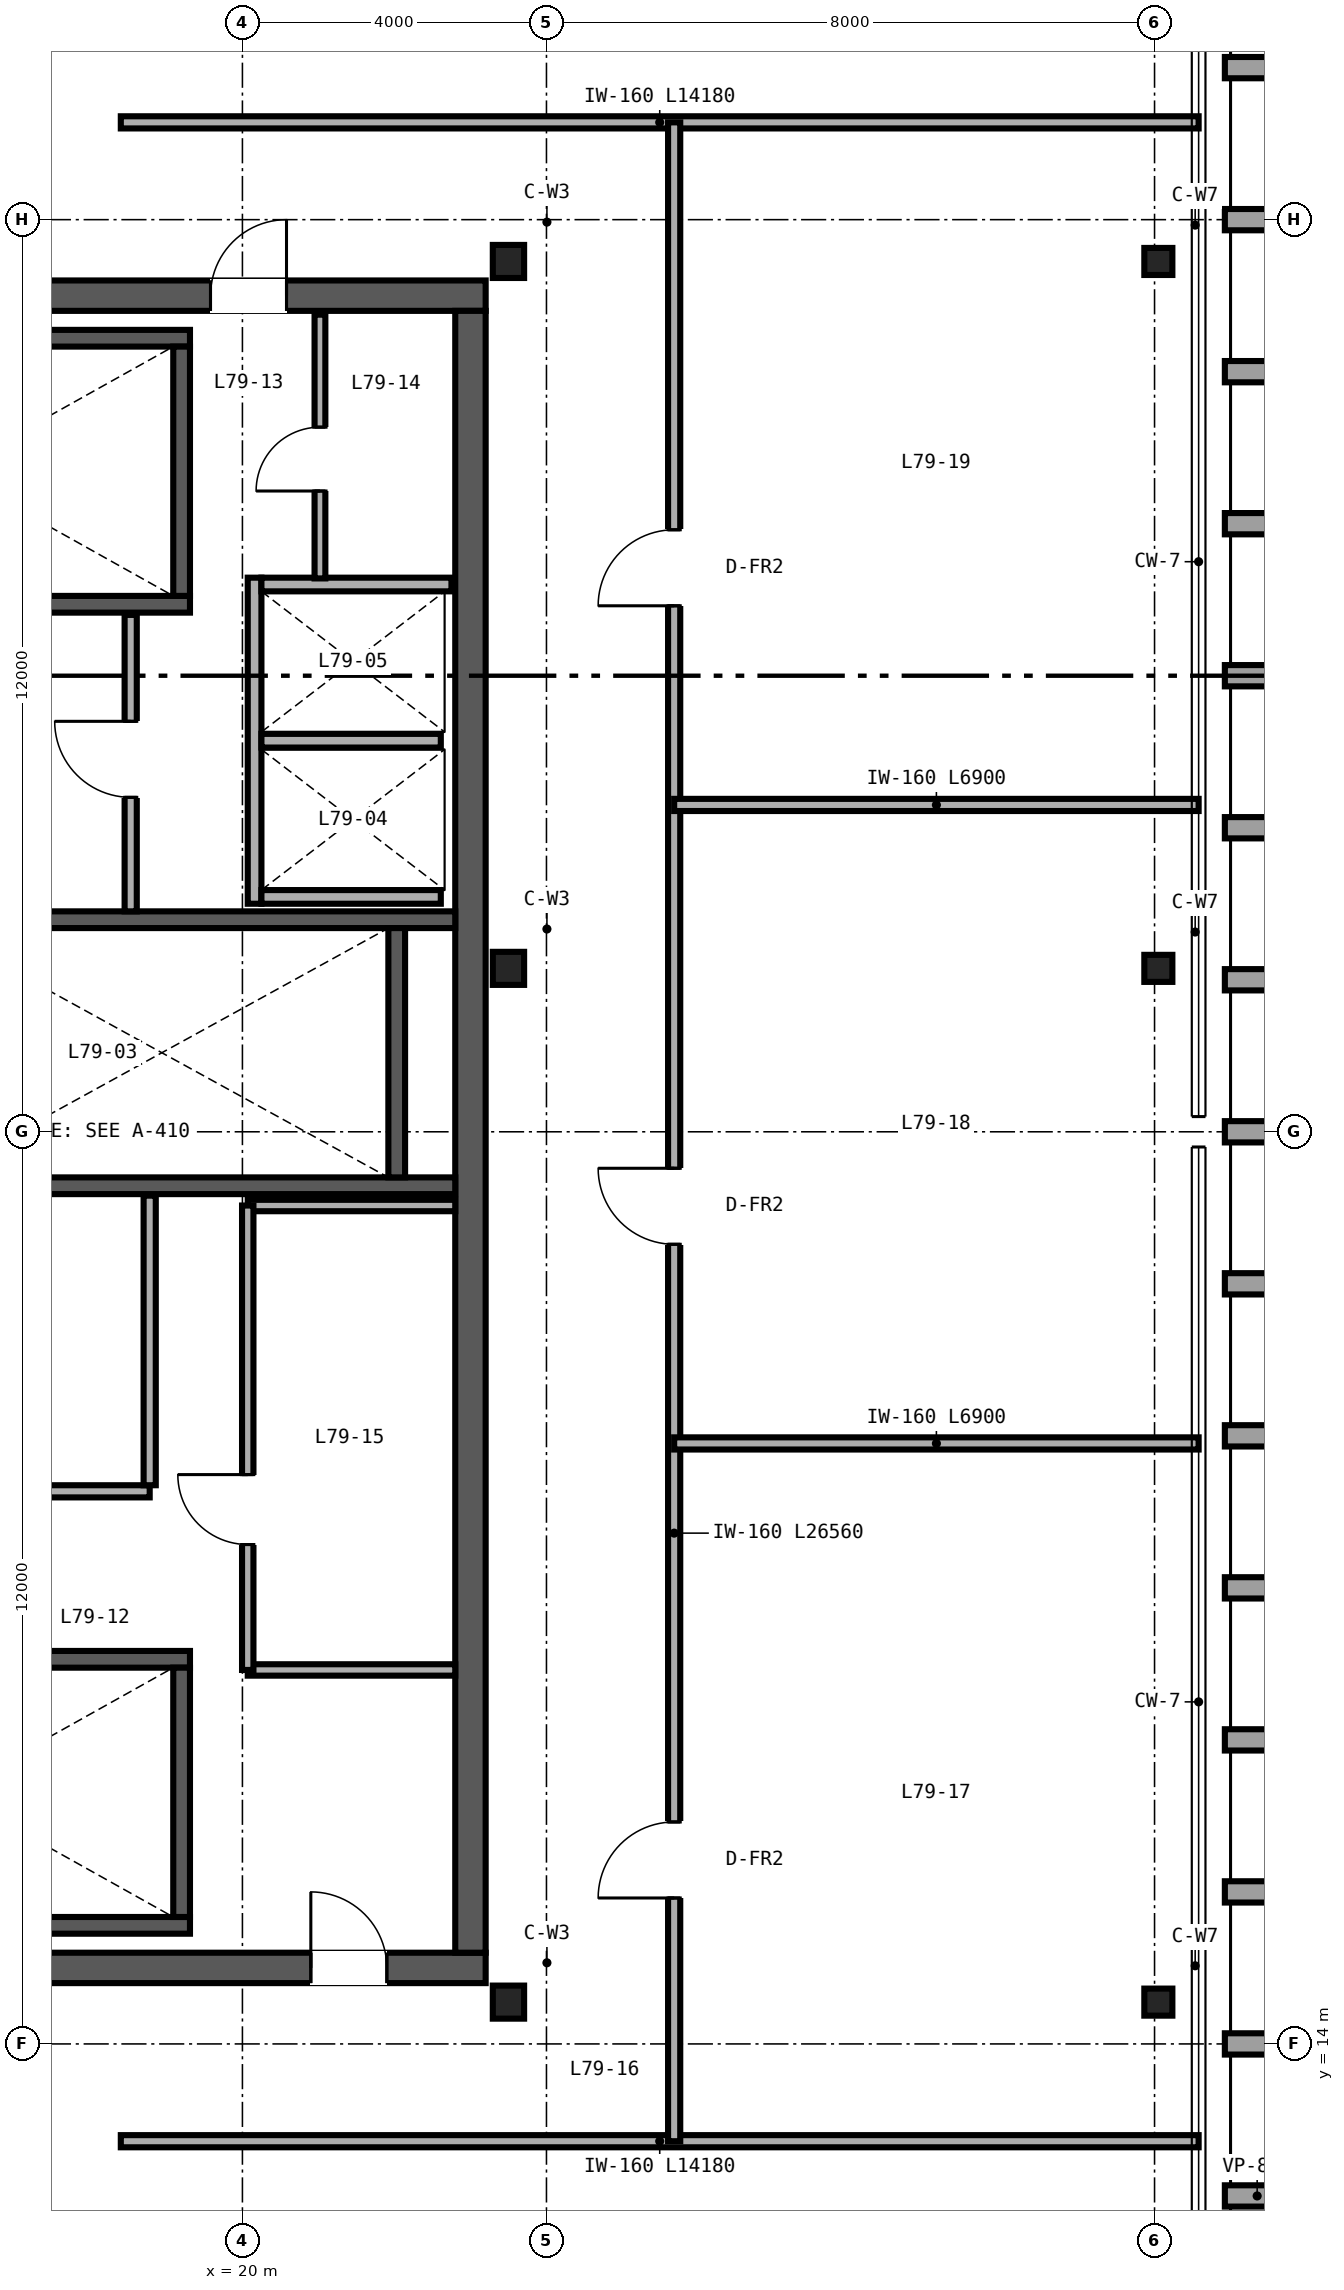
"""IFC4 building model, lengths in metres.
Left out: names, types, materials, properties, quantities, classifications, styles, units other than length and angle.
Written with IfcOpenShell. Run it as: python <this file> out.ifc"""

import sys

from ifc_helpers import new_model, si_unit, direction, frame, frame_2d, origin, origin_2d, place, context, subcontext, project, spatial, rectangle, i_section, extrude, source, transform, mapped, element, fill, save


model = new_model("IFC4")
c1 = context("Model", 3, precision=1e-05, world=origin(), true_north=direction((0.0, 1.0)))
c2 = subcontext(c1, "Body", "Model", "MODEL_VIEW")
j1 = project(units=[si_unit("LENGTHUNIT", "METRE"), si_unit("PLANEANGLEUNIT", "RADIAN")], contexts=[c1])
p1 = place(None, origin())
s1 = spatial("IfcSite", under=j1, at=p1, CompositionType="ELEMENT")
p2 = place(p1, origin())
s2 = spatial("IfcBuilding", under=s1, at=p2, CompositionType="ELEMENT")
p3 = place(p2, frame((0.0, 0.0, 309.6)))
s3 = spatial("IfcBuildingStorey", under=s2, at=p3, CompositionType="ELEMENT", Elevation=309.6)
p4 = place(p3, frame((10.8, 15.0, 0.0), z_axis=(0.0, 0.0, 1.0), x_axis=(1.0, 0.0, 0.0)))
e1 = element("IfcWall", 1, at=p4, inside=s3, PredefinedType="SHEAR", context=c2, shape_type="SweptSolid", body=[
    extrude(rectangle(XDim=12.4, YDim=0.4, at=frame_2d((6.2, 0.0))), origin(), (0.0, 0.0, 1.0), 5.0),
])
p5 = place(p4, frame((10.1, 0.0, 0.0)))
e2 = element("IfcOpeningElement", 2, at=p5, cuts=e1, PredefinedType="OPENING", context=c2, shape_type="SweptSolid", body=[
    extrude(rectangle(XDim=1.0, YDim=2.15, at=frame_2d((0.5, 1.075))), frame((0.0, 0.21, 0.0), z_axis=(0.0, -1.0, 0.0), x_axis=(1.0, 0.0, 0.0)), (0.0, 0.0, 1.0), 0.42),
])
p6 = place(p3, frame((10.8, 37.0, 0.0), z_axis=(0.0, 0.0, 1.0), x_axis=(1.0, 0.0, 0.0)))
e3 = element("IfcWall", 3, at=p6, inside=s3, PredefinedType="SHEAR", context=c2, shape_type="SweptSolid", body=[
    extrude(rectangle(XDim=12.4, YDim=0.4, at=frame_2d((6.2, 0.0))), origin(), (0.0, 0.0, 1.0), 5.0),
])
p7 = place(p6, frame((8.78, 0.0, 0.0)))
e4 = element("IfcOpeningElement", 4, at=p7, cuts=e3, PredefinedType="OPENING", context=c2, shape_type="SweptSolid", body=[
    extrude(rectangle(XDim=1.0, YDim=2.15, at=frame_2d((0.5, 1.075))), frame((0.0, 0.21, 0.0), z_axis=(0.0, -1.0, 0.0), x_axis=(1.0, 0.0, 0.0)), (0.0, 0.0, 1.0), 0.42),
])
p8 = place(p3, frame((23.0, 15.2, 0.0), z_axis=(0.0, 0.0, 1.0), x_axis=(0.0, 1.0, 0.0)))
e5 = element("IfcWall", 5, at=p8, inside=s3, PredefinedType="SHEAR", context=c2, shape_type="SweptSolid", body=[
    extrude(rectangle(XDim=21.6, YDim=0.4, at=frame_2d((10.8, 0.0))), origin(), (0.0, 0.0, 1.0), 5.0),
])
p9 = place(p3, frame((11.2, 15.56, 0.0), z_axis=(0.0, 0.0, 1.0), x_axis=(1.0, 0.0, 0.0)))
e6 = element("IfcWall", 6, at=p9, inside=s3, PredefinedType="SHEAR", context=c2, shape_type="SweptSolid", body=[
    extrude(rectangle(XDim=8.11, YDim=0.22, at=frame_2d((4.055, 0.0))), origin(), (0.0, 0.0, 1.0), 5.0),
])
p10 = place(p3, frame((11.2, 19.06, 0.0), z_axis=(0.0, 0.0, 1.0), x_axis=(1.0, 0.0, 0.0)))
e7 = element("IfcWall", 7, at=p10, inside=s3, PredefinedType="SHEAR", context=c2, shape_type="SweptSolid", body=[
    extrude(rectangle(XDim=8.11, YDim=0.22, at=frame_2d((4.055, 0.0))), origin(), (0.0, 0.0, 1.0), 5.0),
])
p11 = place(p10, frame((0.72, 0.0, 0.0)))
e8 = element("IfcOpeningElement", 8, at=p11, cuts=e7, PredefinedType="OPENING", context=c2, shape_type="SweptSolid", body=[
    extrude(rectangle(XDim=1.05, YDim=2.15, at=frame_2d((0.525, 1.075))), frame((0.0, 0.12, 0.0), z_axis=(0.0, -1.0, 0.0), x_axis=(1.0, 0.0, 0.0)), (0.0, 0.0, 1.0), 0.24),
])
p12 = place(p3, frame((19.2, 15.67, 0.0), z_axis=(0.0, 0.0, 1.0), x_axis=(0.0, 1.0, 0.0)))
e9 = element("IfcWall", 9, at=p12, inside=s3, PredefinedType="SHEAR", context=c2, shape_type="SweptSolid", body=[
    extrude(rectangle(XDim=3.28, YDim=0.22, at=frame_2d((1.64, 0.0))), origin(), (0.0, 0.0, 1.0), 5.0),
])
p13 = place(p3, frame((11.2, 32.94, 0.0), z_axis=(0.0, 0.0, 1.0), x_axis=(1.0, 0.0, 0.0)))
e10 = element("IfcWall", 10, at=p13, inside=s3, PredefinedType="SHEAR", context=c2, shape_type="SweptSolid", body=[
    extrude(rectangle(XDim=8.11, YDim=0.22, at=frame_2d((4.055, 0.0))), origin(), (0.0, 0.0, 1.0), 5.0),
])
p14 = place(p13, frame((0.72, 0.0, 0.0)))
e11 = element("IfcOpeningElement", 11, at=p14, cuts=e10, PredefinedType="OPENING", context=c2, shape_type="SweptSolid", body=[
    extrude(rectangle(XDim=1.05, YDim=2.15, at=frame_2d((0.525, 1.075))), frame((0.0, 0.12, 0.0), z_axis=(0.0, -1.0, 0.0), x_axis=(1.0, 0.0, 0.0)), (0.0, 0.0, 1.0), 0.24),
])
p15 = place(p3, frame((11.2, 36.44, 0.0), z_axis=(0.0, 0.0, 1.0), x_axis=(1.0, 0.0, 0.0)))
e12 = element("IfcWall", 12, at=p15, inside=s3, PredefinedType="SHEAR", context=c2, shape_type="SweptSolid", body=[
    extrude(rectangle(XDim=8.11, YDim=0.22, at=frame_2d((4.055, 0.0))), origin(), (0.0, 0.0, 1.0), 5.0),
])
p16 = place(p3, frame((19.2, 33.05, 0.0), z_axis=(0.0, 0.0, 1.0), x_axis=(0.0, 1.0, 0.0)))
e13 = element("IfcWall", 13, at=p16, inside=s3, PredefinedType="SHEAR", context=c2, shape_type="SweptSolid", body=[
    extrude(rectangle(XDim=3.28, YDim=0.22, at=frame_2d((1.64, 0.0))), origin(), (0.0, 0.0, 1.0), 5.0),
])
p17 = place(p3, frame((14.18, 25.29, 0.0), z_axis=(0.0, 0.0, 1.0), x_axis=(1.0, 0.0, 0.0)))
e14 = element("IfcWall", 14, at=p17, inside=s3, PredefinedType="SHEAR", context=c2, shape_type="SweptSolid", body=[
    extrude(rectangle(XDim=8.62, YDim=0.22, at=frame_2d((4.31, 0.0))), origin(), (0.0, 0.0, 1.0), 5.0),
])
p18 = place(p17, frame((0.47, 0.0, 0.0)))
e15 = element("IfcOpeningElement", 15, at=p18, cuts=e14, PredefinedType="OPENING", context=c2, shape_type="SweptSolid", body=[
    extrude(rectangle(XDim=1.05, YDim=2.15, at=frame_2d((0.525, 1.075))), frame((0.0, 0.12, 0.0), z_axis=(0.0, -1.0, 0.0), x_axis=(1.0, 0.0, 0.0)), (0.0, 0.0, 1.0), 0.24),
])
p19 = place(p3, frame((14.18, 28.79, 0.0), z_axis=(0.0, 0.0, 1.0), x_axis=(1.0, 0.0, 0.0)))
e16 = element("IfcWall", 16, at=p19, inside=s3, PredefinedType="SHEAR", context=c2, shape_type="SweptSolid", body=[
    extrude(rectangle(XDim=8.62, YDim=0.22, at=frame_2d((4.31, 0.0))), origin(), (0.0, 0.0, 1.0), 5.0),
])
p20 = place(p3, frame((22.03, 25.4, 0.0), z_axis=(0.0, 0.0, 1.0), x_axis=(0.0, 1.0, 0.0)))
e17 = element("IfcWall", 17, at=p20, inside=s3, PredefinedType="SHEAR", context=c2, shape_type="SweptSolid", body=[
    extrude(rectangle(XDim=3.28, YDim=0.22, at=frame_2d((1.64, 0.0))), origin(), (0.0, 0.0, 1.0), 5.0),
])
m1 = source(origin(), c2, "Body", "SweptSolid", [
    extrude(i_section(OverallWidth=0.412, OverallDepth=0.435, WebThickness=0.036, FlangeThickness=0.057, FilletRadius=0.025, at=origin_2d()), origin(), (0.0, 0.0, 1.0), 5.0),
])
for number, where, z_axis, x_axis in (
    (18, (23.5, 14.55, 0.0), (0.0, 0.0, 1.0), (1.0, 0.0, 0.0)),
    (19, (23.5, 28.15, 0.0), (0.0, 0.0, 1.0), (1.0, 0.0, 0.0)),
    (20, (23.5, 37.45, 0.0), (0.0, 0.0, 1.0), (1.0, 0.0, 0.0)),
):
    element("IfcColumn", number, at=place(p3, frame(where, z_axis=z_axis, x_axis=x_axis)), inside=s3, PredefinedType="COLUMN", context=c2, shape_type="MappedRepresentation", body=[
        mapped(m1, transform((0.0, 0.0, 0.0), scale=1.0)),
    ])
m2 = source(origin(), c2, "Body", "SweptSolid", [
    extrude(i_section(OverallWidth=0.369, OverallDepth=0.356, WebThickness=0.011, FlangeThickness=0.018, FilletRadius=0.025, at=origin_2d()), origin(), (0.0, 0.0, 1.0), 5.0),
])
for number, where, z_axis, x_axis in (
    (21, (32.05, 14.55, 0.0), (0.0, 0.0, 1.0), (1.0, 0.0, 0.0)),
    (22, (32.05, 28.15, 0.0), (0.0, 0.0, 1.0), (1.0, 0.0, 0.0)),
    (23, (32.05, 37.45, 0.0), (0.0, 0.0, 1.0), (1.0, 0.0, 0.0)),
):
    element("IfcColumn", number, at=place(p3, frame(where, z_axis=z_axis, x_axis=x_axis)), inside=s3, PredefinedType="COLUMN", context=c2, shape_type="MappedRepresentation", body=[
        mapped(m2, transform((0.0, 0.0, 0.0), scale=1.0)),
    ])
p21 = place(p3, frame((20.16, 29.0, 0.0), z_axis=(0.0, 0.0, 1.0), x_axis=(0.0, 1.0, 0.0)))
e24 = element("IfcWall", 24, at=p21, inside=s3, PredefinedType="SOLIDWALL", context=c2, shape_type="SweptSolid", body=[
    extrude(rectangle(XDim=4.29, YDim=0.18, at=frame_2d((2.145, 0.0))), origin(), (0.0, 0.0, 1.0), 4.591),
])
p22 = place(p3, frame((20.25, 29.09, 0.0), z_axis=(0.0, 0.0, 1.0), x_axis=(1.0, 0.0, 0.0)))
e25 = element("IfcWall", 25, at=p22, inside=s3, PredefinedType="SOLIDWALL", context=c2, shape_type="SweptSolid", body=[
    extrude(rectangle(XDim=2.36, YDim=0.18, at=frame_2d((1.18, 0.0))), origin(), (0.0, 0.0, 1.0), 4.591),
])
p23 = place(p3, frame((20.25, 33.2, 0.0), z_axis=(0.0, 0.0, 1.0), x_axis=(1.0, 0.0, 0.0)))
e26 = element("IfcWall", 26, at=p23, inside=s3, PredefinedType="SOLIDWALL", context=c2, shape_type="SweptSolid", body=[
    extrude(rectangle(XDim=2.5, YDim=0.18, at=frame_2d((1.25, 0.0))), origin(), (0.0, 0.0, 1.0), 5.0),
])
p24 = place(p3, frame((20.25, 31.145, 0.0), z_axis=(0.0, 0.0, 1.0), x_axis=(1.0, 0.0, 0.0)))
e27 = element("IfcWall", 27, at=p24, inside=s3, PredefinedType="SOLIDWALL", context=c2, shape_type="SweptSolid", body=[
    extrude(rectangle(XDim=2.36, YDim=0.18, at=frame_2d((1.18, 0.0))), origin(), (0.0, 0.0, 1.0), 5.0),
])
p25 = place(p3, frame((14.2, 21.27, 0.0), z_axis=(0.0, 0.0, 1.0), x_axis=(1.0, 0.0, 0.0)))
e28 = element("IfcWall", 28, at=p25, inside=s3, PredefinedType="PARTITIONING", context=c2, shape_type="SweptSolid", body=[
    extrude(rectangle(XDim=4.58, YDim=0.16, at=frame_2d((2.29, 0.0))), origin(), (0.0, 0.0, 1.0), 5.0),
])
p26 = place(p25, frame((1.8, 0.0, 0.0)))
e29 = element("IfcOpeningElement", 29, at=p26, cuts=e28, PredefinedType="OPENING", context=c2, shape_type="SweptSolid", body=[
    extrude(rectangle(XDim=1.0, YDim=2.15, at=frame_2d((0.5, 1.075))), frame((0.0, 0.09, 0.0), z_axis=(0.0, -1.0, 0.0), x_axis=(1.0, 0.0, 0.0)), (0.0, 0.0, 1.0), 0.18),
])
p27 = place(p3, frame((18.78, 21.35, 0.0), z_axis=(0.0, 0.0, 1.0), x_axis=(0.0, 1.0, 0.0)))
e30 = element("IfcWall", 30, at=p27, inside=s3, PredefinedType="PARTITIONING", context=c2, shape_type="SweptSolid", body=[
    extrude(rectangle(XDim=3.81, YDim=0.16, at=frame_2d((1.905, 0.0))), origin(), (0.0, 0.0, 1.0), 4.591),
])
p28 = place(p3, frame((18.53, 28.9, 0.0), z_axis=(0.0, 0.0, 1.0), x_axis=(0.0, 1.0, 0.0)))
e31 = element("IfcWall", 31, at=p28, inside=s3, PredefinedType="PARTITIONING", context=c2, shape_type="SweptSolid", body=[
    extrude(rectangle(XDim=3.9, YDim=0.16, at=frame_2d((1.95, 0.0))), origin(), (0.0, 0.0, 1.0), 4.591),
])
p29 = place(p28, frame((1.5, 0.0, 0.0)))
e32 = element("IfcOpeningElement", 32, at=p29, cuts=e31, PredefinedType="OPENING", context=c2, shape_type="SweptSolid", body=[
    extrude(rectangle(XDim=1.0, YDim=2.15, at=frame_2d((0.5, 1.075))), frame((0.0, 0.09, 0.0), z_axis=(0.0, -1.0, 0.0), x_axis=(1.0, 0.0, 0.0)), (0.0, 0.0, 1.0), 0.18),
])
p30 = place(p3, frame((21.02, 33.28, 0.0), z_axis=(0.0, 0.0, 1.0), x_axis=(0.0, 1.0, 0.0)))
e33 = element("IfcWall", 33, at=p30, inside=s3, PredefinedType="PARTITIONING", context=c2, shape_type="SweptSolid", body=[
    extrude(rectangle(XDim=3.47, YDim=0.142, at=frame_2d((1.735, 0.0))), origin(), (0.0, 0.0, 1.0), 5.0),
])
p31 = place(p30, frame((1.15, 0.0, 0.0)))
e34 = element("IfcOpeningElement", 34, at=p31, cuts=e33, PredefinedType="OPENING", context=c2, shape_type="SweptSolid", body=[
    extrude(rectangle(XDim=0.84, YDim=2.1, at=frame_2d((0.42, 1.05))), frame((0.0, 0.081, 0.0), z_axis=(0.0, -1.0, 0.0), x_axis=(1.0, 0.0, 0.0)), (0.0, 0.0, 1.0), 0.162),
])
for number, where, z_axis, x_axis in (
    (35, (20.07, 18.92, 0.0), (0.0, 0.0, 1.0), (1.0, 0.0, 0.0)),
    (36, (20.07, 25.03, 0.0), (0.0, 0.0, 1.0), (1.0, 0.0, 0.0)),
):
    element("IfcWall", number, at=place(p3, frame(where, z_axis=z_axis, x_axis=x_axis)), inside=s3, PredefinedType="PARTITIONING", context=c2, shape_type="SweptSolid", body=[
        extrude(rectangle(XDim=2.73, YDim=0.15, at=frame_2d((1.365, 0.0))), origin(), (0.0, 0.0, 1.0), 5.0),
    ])
p32 = place(p3, frame((20.07, 18.92, 0.0), z_axis=(0.0, 0.0, 1.0), x_axis=(0.0, 1.0, 0.0)))
e37 = element("IfcWall", 37, at=p32, inside=s3, PredefinedType="PARTITIONING", context=c2, shape_type="SweptSolid", body=[
    extrude(rectangle(XDim=6.11, YDim=0.15, at=frame_2d((3.055, 0.0))), origin(), (0.0, 0.0, 1.0), 4.1),
])
p33 = place(p32, frame((1.65, 0.0, 0.0)))
e38 = element("IfcOpeningElement", 38, at=p33, cuts=e37, PredefinedType="OPENING", context=c2, shape_type="SweptSolid", body=[
    extrude(rectangle(XDim=0.92, YDim=2.15, at=frame_2d((0.46, 1.075))), frame((0.0, 0.085, 0.0), z_axis=(0.0, -1.0, 0.0), x_axis=(1.0, 0.0, 0.0)), (0.0, 0.0, 1.0), 0.17),
])
for number, where, z_axis, x_axis in (
    (39, (18.4, 12.72, 0.0), (0.0, 0.0, 1.0), (1.0, 0.0, 0.0)),
    (40, (18.4, 39.28, 0.0), (0.0, 0.0, 1.0), (1.0, 0.0, 0.0)),
):
    element("IfcWall", number, at=place(p3, frame(where, z_axis=z_axis, x_axis=x_axis)), inside=s3, PredefinedType="PARTITIONING", context=c2, shape_type="SweptSolid", body=[
        extrude(rectangle(XDim=14.18, YDim=0.16, at=frame_2d((7.09, 0.0))), origin(), (0.0, 0.0, 1.0), 5.0),
    ])
p34 = place(p3, frame((25.68, 12.72, 0.0), z_axis=(0.0, 0.0, 1.0), x_axis=(0.0, 1.0, 0.0)))
e41 = element("IfcWall", 41, at=p34, inside=s3, PredefinedType="PARTITIONING", context=c2, shape_type="SweptSolid", body=[
    extrude(rectangle(XDim=26.56, YDim=0.16, at=frame_2d((13.28, 0.0))), origin(), (0.0, 0.0, 1.0), 4.144),
])
p35 = place(p34, frame((3.2, 0.0, 0.0)))
e42 = element("IfcOpeningElement", 42, at=p35, cuts=e41, PredefinedType="OPENING", context=c2, shape_type="SweptSolid", body=[
    extrude(rectangle(XDim=1.0, YDim=2.15, at=frame_2d((0.5, 1.075))), frame((0.0, 0.09, 0.0), z_axis=(0.0, -1.0, 0.0), x_axis=(1.0, 0.0, 0.0)), (0.0, 0.0, 1.0), 0.18),
])
p36 = place(p34, frame((11.8, 0.0, 0.0)))
e43 = element("IfcOpeningElement", 43, at=p36, cuts=e41, PredefinedType="OPENING", context=c2, shape_type="SweptSolid", body=[
    extrude(rectangle(XDim=1.0, YDim=2.15, at=frame_2d((0.5, 1.075))), frame((0.0, 0.09, 0.0), z_axis=(0.0, -1.0, 0.0), x_axis=(1.0, 0.0, 0.0)), (0.0, 0.0, 1.0), 0.18),
])
p37 = place(p34, frame((20.2, 0.0, 0.0)))
e44 = element("IfcOpeningElement", 44, at=p37, cuts=e41, PredefinedType="OPENING", context=c2, shape_type="SweptSolid", body=[
    extrude(rectangle(XDim=1.0, YDim=2.15, at=frame_2d((0.5, 1.075))), frame((0.0, 0.09, 0.0), z_axis=(0.0, -1.0, 0.0), x_axis=(1.0, 0.0, 0.0)), (0.0, 0.0, 1.0), 0.18),
])
p38 = place(p3, frame((25.68, 21.9, 0.0), z_axis=(0.0, 0.0, 1.0), x_axis=(1.0, 0.0, 0.0)))
e45 = element("IfcWall", 45, at=p38, inside=s3, PredefinedType="PARTITIONING", context=c2, shape_type="SweptSolid", body=[
    extrude(rectangle(XDim=6.9, YDim=0.16, at=frame_2d((3.45, 0.0))), origin(), (0.0, 0.0, 1.0), 4.221),
])
p39 = place(p3, frame((25.68, 30.3, 0.0), z_axis=(0.0, 0.0, 1.0), x_axis=(1.0, 0.0, 0.0)))
e46 = element("IfcWall", 46, at=p39, inside=s3, PredefinedType="PARTITIONING", context=c2, shape_type="SweptSolid", body=[
    extrude(rectangle(XDim=6.9, YDim=0.16, at=frame_2d((3.45, 0.0))), origin(), (0.0, 0.0, 1.0), 4.383),
])
m3 = source(origin(), c2, "Body", "SweptSolid", [
    extrude(rectangle(XDim=1.0, YDim=2.15, at=frame_2d((0.5, 1.075))), frame((0.0, 0.025, 0.0), z_axis=(0.0, -1.0, 0.0), x_axis=(1.0, 0.0, 0.0)), (0.0, 0.0, 1.0), 0.05),
])
p40 = place(p29, origin())
e47 = element("IfcDoor", 47, at=p40, inside=s3, OperationType="SINGLE_SWING_RIGHT", PredefinedType="DOOR", context=c2, shape_type="MappedRepresentation", body=[
    mapped(m3, transform((0.0, 0.0, 0.0), scale=1.0)),
])
fill(e32, e47)
m4 = source(origin(), c2, "Body", "SweptSolid", [
    extrude(rectangle(XDim=0.84, YDim=2.1, at=frame_2d((0.42, 1.05))), frame((0.0, 0.025, 0.0), z_axis=(0.0, -1.0, 0.0), x_axis=(1.0, 0.0, 0.0)), (0.0, 0.0, 1.0), 0.05),
])
p41 = place(p31, origin())
e48 = element("IfcDoor", 48, at=p41, inside=s3, OperationType="SINGLE_SWING_LEFT", PredefinedType="DOOR", context=c2, shape_type="MappedRepresentation", body=[
    mapped(m4, transform((0.0, 0.0, 0.0), scale=1.0)),
])
fill(e34, e48)
p42 = place(p5, origin())
e49 = element("IfcDoor", 49, at=p42, inside=s3, OperationType="SINGLE_SWING_LEFT", PredefinedType="DOOR", context=c2, shape_type="MappedRepresentation", body=[
    mapped(m3, transform((0.0, 0.0, 0.0), scale=1.0)),
])
fill(e2, e49)
p43 = place(p7, origin())
e50 = element("IfcDoor", 50, at=p43, inside=s3, OperationType="SINGLE_SWING_RIGHT", PredefinedType="DOOR", context=c2, shape_type="MappedRepresentation", body=[
    mapped(m3, transform((0.0, 0.0, 0.0), scale=1.0)),
])
fill(e4, e50)
m5 = source(origin(), c2, "Body", "SweptSolid", [
    extrude(rectangle(XDim=0.92, YDim=2.15, at=frame_2d((0.46, 1.075))), frame((0.0, 0.025, 0.0), z_axis=(0.0, -1.0, 0.0), x_axis=(1.0, 0.0, 0.0)), (0.0, 0.0, 1.0), 0.05),
])
p44 = place(p33, origin())
e51 = element("IfcDoor", 51, at=p44, inside=s3, OperationType="SINGLE_SWING_RIGHT", PredefinedType="DOOR", context=c2, shape_type="MappedRepresentation", body=[
    mapped(m5, transform((0.0, 0.0, 0.0), scale=1.0)),
])
fill(e38, e51)
p45 = place(p35, origin())
e52 = element("IfcDoor", 52, at=p45, inside=s3, OperationType="SINGLE_SWING_LEFT", PredefinedType="DOOR", context=c2, shape_type="MappedRepresentation", body=[
    mapped(m3, transform((0.0, 0.0, 0.0), scale=1.0)),
])
fill(e42, e52)
p46 = place(p36, origin())
e53 = element("IfcDoor", 53, at=p46, inside=s3, OperationType="SINGLE_SWING_RIGHT", PredefinedType="DOOR", context=c2, shape_type="MappedRepresentation", body=[
    mapped(m3, transform((0.0, 0.0, 0.0), scale=1.0)),
])
fill(e43, e53)
p47 = place(p37, origin())
e54 = element("IfcDoor", 54, at=p47, inside=s3, OperationType="SINGLE_SWING_LEFT", PredefinedType="DOOR", context=c2, shape_type="MappedRepresentation", body=[
    mapped(m3, transform((0.0, 0.0, 0.0), scale=1.0)),
])
fill(e44, e54)
save(model, sys.argv[1])
